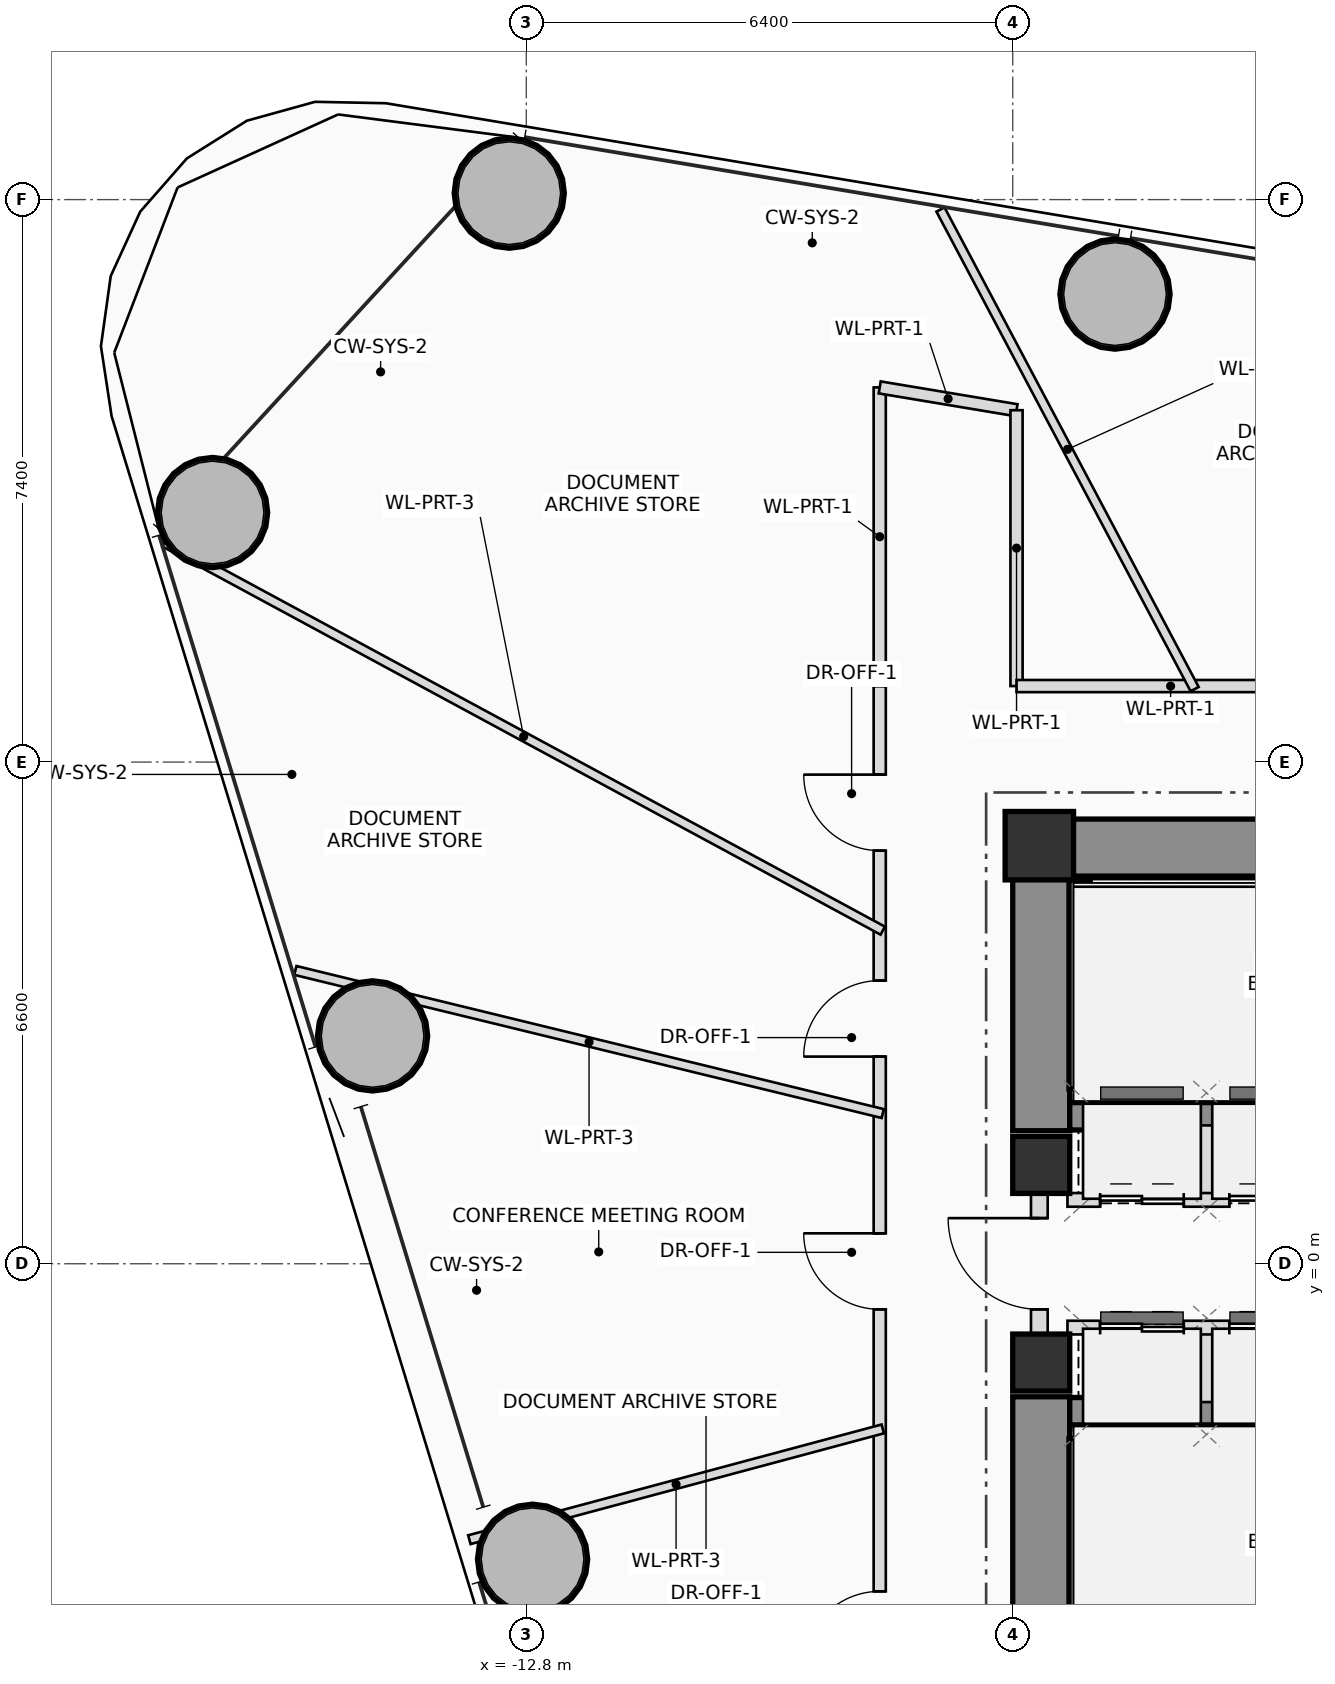
"""IFC4 building model, lengths in metres.
Left out: names, types, materials, properties, quantities, classifications, styles, units other than length and angle.
Written with IfcOpenShell. Run it as: python <this file> out.ifc"""

import sys

from ifc_helpers import new_model, si_unit, direction, frame, frame_2d, origin, origin_2d, place, context, subcontext, project, spatial, rectangle, hollow_circle, extrude, source, transform, mapped, element, fill, save


model = new_model("IFC4")
c1 = context("Model", 3, precision=1e-05, world=origin(), true_north=direction((0.0, 1.0)))
c2 = subcontext(c1, "Body", "Model", "MODEL_VIEW")
j1 = project(units=[si_unit("LENGTHUNIT", "METRE"), si_unit("PLANEANGLEUNIT", "RADIAN")], contexts=[c1])
p1 = place(None, origin())
s1 = spatial("IfcSite", under=j1, at=p1, CompositionType="ELEMENT")
p2 = place(p1, origin())
s2 = spatial("IfcBuilding", under=s1, at=p2, CompositionType="ELEMENT")
p3 = place(p2, frame((0.0, 0.0, 112.4)))
s3 = spatial("IfcBuildingStorey", under=s2, at=p3, CompositionType="ELEMENT", Elevation=112.4)
m1 = source(origin(), c2, "Body", "SweptSolid", [
    extrude(rectangle(XDim=0.9, YDim=0.9, at=origin_2d()), origin(), (0.0, 0.0, 1.0), 3.75),
])
p4 = place(p3, frame((-6.05, 5.5, 0.0), z_axis=(0.0, 0.0, 1.0), x_axis=(1.0, 0.0, 0.0)))
e1 = element("IfcColumn", 1, at=p4, inside=s3, PredefinedType="COLUMN", context=c2, shape_type="MappedRepresentation", body=[
    mapped(m1, transform((0.0, 0.0, 0.0), scale=1.0)),
])
p5 = place(p3, frame((-6.4, 5.475, 0.0), z_axis=(0.0, 0.0, 1.0), x_axis=(1.0, 0.0, 0.0)))
e2 = element("IfcWall", 2, at=p5, inside=s3, PredefinedType="SHEAR", context=c2, shape_type="SweptSolid", body=[
    extrude(rectangle(XDim=12.8, YDim=0.75, at=frame_2d((6.4, 0.0))), origin(), (0.0, 0.0, 1.0), 3.75),
])
p6 = place(p5, frame((8.6, 0.0, 0.0)))
e3 = element("IfcOpeningElement", 3, at=p6, cuts=e2, PredefinedType="OPENING", context=c2, shape_type="SweptSolid", body=[
    extrude(rectangle(XDim=1.2, YDim=2.2, at=frame_2d((0.6, 1.1))), frame((0.0, 0.385, 0.0), z_axis=(0.0, -1.0, 0.0), x_axis=(1.0, 0.0, 0.0)), (0.0, 0.0, 1.0), 0.77),
])
for number, where, z_axis, x_axis in (
    (4, (-6.025, -5.1, 0.0), (0.0, 0.0, 1.0), (0.0, 1.0, 0.0)),
    (5, (-6.025, 1.75, 0.0), (0.0, 0.0, 1.0), (0.0, 1.0, 0.0)),
):
    element("IfcWall", number, at=place(p3, frame(where, z_axis=z_axis, x_axis=x_axis)), inside=s3, PredefinedType="SHEAR", context=c2, shape_type="SweptSolid", body=[
        extrude(rectangle(XDim=3.35, YDim=0.75, at=frame_2d((1.675, 0.0))), origin(), (0.0, 0.0, 1.0), 3.75),
    ])
for number, where, z_axis, x_axis in (
    (6, (-5.65, 1.94, 0.0), (0.0, 0.0, 1.0), (1.0, 0.0, 0.0)),
    (7, (-5.65, -1.94, 0.0), (0.0, 0.0, 1.0), (1.0, 0.0, 0.0)),
):
    element("IfcWall", number, at=place(p3, frame(where, z_axis=z_axis, x_axis=x_axis)), inside=s3, PredefinedType="SHEAR", context=c2, shape_type="SweptSolid", body=[
        extrude(rectangle(XDim=11.3, YDim=0.36, at=frame_2d((5.65, 0.0))), origin(), (0.0, 0.0, 1.0), 3.75),
    ])
for number, where, z_axis, x_axis in (
    (8, (-5.52, 2.3, 0.0), (0.0, 0.0, 1.0), (0.0, 1.0, 0.0)),
    (9, (-5.52, -5.05, 0.0), (0.0, 0.0, 1.0), (0.0, 1.0, 0.0)),
):
    element("IfcWall", number, at=place(p3, frame(where, z_axis=z_axis, x_axis=x_axis)), inside=s3, PredefinedType="SHEAR", context=c2, shape_type="SweptSolid", body=[
        extrude(rectangle(XDim=2.75, YDim=0.28, at=frame_2d((1.375, 0.0))), origin(), (0.0, 0.0, 1.0), 3.75),
    ])
m2 = source(origin(), c2, "Body", "SweptSolid", [
    extrude(rectangle(XDim=0.75, YDim=0.75, at=origin_2d()), origin(), (0.0, 0.0, 1.0), 3.75),
])
for number, where, z_axis, x_axis in (
    (10, (-6.025, -1.3, 0.0), (0.0, 0.0, 1.0), (1.0, 0.0, 0.0)),
    (11, (-6.025, 1.3, 0.0), (0.0, 0.0, 1.0), (1.0, 0.0, 0.0)),
):
    element("IfcColumn", number, at=place(p3, frame(where, z_axis=z_axis, x_axis=x_axis)), inside=s3, PredefinedType="COLUMN", context=c2, shape_type="MappedRepresentation", body=[
        mapped(m2, transform((0.0, 0.0, 0.0), scale=1.0)),
    ])
m3 = source(origin(), c2, "Body", "SweptSolid", [
    extrude(hollow_circle(Radius=0.725, WallThickness=0.05, at=origin_2d()), origin(), (0.0, 0.0, 1.0), 3.75),
])
for number, where, z_axis, x_axis in (
    (12, (-5.054, 12.757, 0.0), (0.0, 0.0, 1.0), (1.0, 0.0, 0.0)),
    (13, (-13.024, 14.085, 0.0), (0.0, 0.0, 1.0), (1.0, 0.0, 0.0)),
    (14, (-16.927, 9.883, 0.0), (0.0, 0.0, 1.0), (1.0, 0.0, 0.0)),
    (15, (-14.823, 2.998, 0.0), (0.0, 0.0, 1.0), (1.0, 0.0, 0.0)),
    (16, (-12.717, -3.888, 0.0), (0.0, 0.0, 1.0), (1.0, 0.0, 0.0)),
):
    element("IfcColumn", number, at=place(p3, frame(where, z_axis=z_axis, x_axis=x_axis)), inside=s3, PredefinedType="COLUMN", context=c2, shape_type="MappedRepresentation", body=[
        mapped(m3, transform((0.0, 0.0, 0.0), scale=1.0)),
    ])
p7 = place(p3, frame((-6.05, -0.95, 0.0), z_axis=(0.0, 0.0, 1.0), x_axis=(0.0, 1.0, 0.0)))
e17 = element("IfcWall", 17, at=p7, inside=s3, PredefinedType="PLUMBINGWALL", context=c2, shape_type="SweptSolid", body=[
    extrude(rectangle(XDim=1.9, YDim=0.22, at=frame_2d((0.95, 0.0))), origin(), (0.0, 0.0, 1.0), 2.525),
])
p8 = place(p7, frame((0.35, 0.0, 0.0)))
e18 = element("IfcOpeningElement", 18, at=p8, cuts=e17, PredefinedType="OPENING", context=c2, shape_type="SweptSolid", body=[
    extrude(rectangle(XDim=1.2, YDim=2.2, at=frame_2d((0.6, 1.1))), frame((0.0, 0.12, 0.0), z_axis=(0.0, -1.0, 0.0), x_axis=(1.0, 0.0, 0.0)), (0.0, 0.0, 1.0), 0.24),
])
for number, where, z_axis, x_axis in (
    (19, (-3.85, 0.84, 0.0), (0.0, 0.0, 1.0), (0.0, 1.0, 0.0)),
    (20, (-3.85, -1.82, 0.0), (0.0, 0.0, 1.0), (0.0, 1.0, 0.0)),
):
    element("IfcWall", number, at=place(p3, frame(where, z_axis=z_axis, x_axis=x_axis)), inside=s3, PredefinedType="PLUMBINGWALL", context=c2, shape_type="SweptSolid", body=[
        extrude(rectangle(XDim=0.98, YDim=0.18, at=frame_2d((0.49, 0.0))), origin(), (0.0, 0.0, 1.0), 3.545),
    ])
p9 = place(p3, frame((-5.68, 0.84, 0.0), z_axis=(0.0, 0.0, 1.0), x_axis=(1.0, 0.0, 0.0)))
e21 = element("IfcWall", 21, at=p9, inside=s3, PredefinedType="PLUMBINGWALL", context=c2, shape_type="SweptSolid", body=[
    extrude(rectangle(XDim=11.33, YDim=0.18, at=frame_2d((5.665, 0.0))), origin(), (0.0, 0.0, 1.0), 3.545),
])
p10 = place(p9, frame((0.43, 0.0, 0.0)))
e22 = element("IfcOpeningElement", 22, at=p10, cuts=e21, PredefinedType="OPENING", context=c2, shape_type="SweptSolid", body=[
    extrude(rectangle(XDim=1.1, YDim=2.2, at=frame_2d((0.55, 1.1))), frame((0.0, 0.1, 0.0), z_axis=(0.0, -1.0, 0.0), x_axis=(1.0, 0.0, 0.0)), (0.0, 0.0, 1.0), 0.2),
])
p11 = place(p9, frame((2.13, 0.0, 0.0)))
e23 = element("IfcOpeningElement", 23, at=p11, cuts=e21, PredefinedType="OPENING", context=c2, shape_type="SweptSolid", body=[
    extrude(rectangle(XDim=1.1, YDim=2.2, at=frame_2d((0.55, 1.1))), frame((0.0, 0.1, 0.0), z_axis=(0.0, -1.0, 0.0), x_axis=(1.0, 0.0, 0.0)), (0.0, 0.0, 1.0), 0.2),
])
p12 = place(p3, frame((-5.68, -0.84, 0.0), z_axis=(0.0, 0.0, 1.0), x_axis=(1.0, 0.0, 0.0)))
e24 = element("IfcWall", 24, at=p12, inside=s3, PredefinedType="PLUMBINGWALL", context=c2, shape_type="SweptSolid", body=[
    extrude(rectangle(XDim=10.22, YDim=0.18, at=frame_2d((5.11, 0.0))), origin(), (0.0, 0.0, 1.0), 3.545),
])
p13 = place(p12, frame((0.43, 0.0, 0.0)))
e25 = element("IfcOpeningElement", 25, at=p13, cuts=e24, PredefinedType="OPENING", context=c2, shape_type="SweptSolid", body=[
    extrude(rectangle(XDim=1.1, YDim=2.2, at=frame_2d((0.55, 1.1))), frame((0.0, 0.1, 0.0), z_axis=(0.0, -1.0, 0.0), x_axis=(1.0, 0.0, 0.0)), (0.0, 0.0, 1.0), 0.2),
])
p14 = place(p12, frame((2.13, 0.0, 0.0)))
e26 = element("IfcOpeningElement", 26, at=p14, cuts=e24, PredefinedType="OPENING", context=c2, shape_type="SweptSolid", body=[
    extrude(rectangle(XDim=1.1, YDim=2.2, at=frame_2d((0.55, 1.1))), frame((0.0, 0.1, 0.0), z_axis=(0.0, -1.0, 0.0), x_axis=(1.0, 0.0, 0.0)), (0.0, 0.0, 1.0), 0.2),
])
p15 = place(p12, frame((9.02, 0.0, 0.0)))
e27 = element("IfcOpeningElement", 27, at=p15, cuts=e24, PredefinedType="OPENING", context=c2, shape_type="SweptSolid", body=[
    extrude(rectangle(XDim=0.9, YDim=2.05, at=frame_2d((0.45, 1.025))), frame((0.0, 0.1, 0.0), z_axis=(0.0, -1.0, 0.0), x_axis=(1.0, 0.0, 0.0)), (0.0, 0.0, 1.0), 0.2),
])
p16 = place(p3, frame((-8.15, -7.6, 0.0), z_axis=(0.0, 0.0, 1.0), x_axis=(0.0, 1.0, 0.0)))
e28 = element("IfcWall", 28, at=p16, inside=s3, PredefinedType="PARTITIONING", context=c2, shape_type="SweptSolid", body=[
    extrude(rectangle(XDim=15.2, YDim=0.16, at=frame_2d((7.6, 0.0))), origin(), (0.0, 0.0, 1.0), 2.85),
])
p17 = place(p16, frame((2.29, 0.0, 0.0)))
e29 = element("IfcOpeningElement", 29, at=p17, cuts=e28, PredefinedType="OPENING", context=c2, shape_type="SweptSolid", body=[
    extrude(rectangle(XDim=1.0, YDim=2.25, at=frame_2d((0.5, 1.125))), frame((0.0, 0.09, 0.0), z_axis=(0.0, -1.0, 0.0), x_axis=(1.0, 0.0, 0.0)), (0.0, 0.0, 1.0), 0.18),
])
p18 = place(p16, frame((7.0, 0.0, 0.0)))
e30 = element("IfcOpeningElement", 30, at=p18, cuts=e28, PredefinedType="OPENING", context=c2, shape_type="SweptSolid", body=[
    extrude(rectangle(XDim=1.0, YDim=2.25, at=frame_2d((0.5, 1.125))), frame((0.0, 0.09, 0.0), z_axis=(0.0, -1.0, 0.0), x_axis=(1.0, 0.0, 0.0)), (0.0, 0.0, 1.0), 0.18),
])
p19 = place(p16, frame((10.325, 0.0, 0.0)))
e31 = element("IfcOpeningElement", 31, at=p19, cuts=e28, PredefinedType="OPENING", context=c2, shape_type="SweptSolid", body=[
    extrude(rectangle(XDim=1.0, YDim=2.25, at=frame_2d((0.5, 1.125))), frame((0.0, 0.09, 0.0), z_axis=(0.0, -1.0, 0.0), x_axis=(1.0, 0.0, 0.0)), (0.0, 0.0, 1.0), 0.18),
])
p20 = place(p16, frame((13.035, 0.0, 0.0)))
e32 = element("IfcOpeningElement", 32, at=p20, cuts=e28, PredefinedType="OPENING", context=c2, shape_type="SweptSolid", body=[
    extrude(rectangle(XDim=1.0, YDim=2.25, at=frame_2d((0.5, 1.125))), frame((0.0, 0.09, 0.0), z_axis=(0.0, -1.0, 0.0), x_axis=(1.0, 0.0, 0.0)), (0.0, 0.0, 1.0), 0.18),
])
p21 = place(p3, frame((-8.15, 7.6, 0.0), z_axis=(0.0, 0.0, 1.0), x_axis=(0.0, 1.0, 0.0)))
e33 = element("IfcWall", 33, at=p21, inside=s3, PredefinedType="PARTITIONING", context=c2, shape_type="SweptSolid", body=[
    extrude(rectangle(XDim=3.929, YDim=0.16, at=frame_2d((1.964, 0.0))), origin(), (0.0, 0.0, 1.0), 2.85),
])
p22 = place(p3, frame((-8.15, 11.529, 0.0), z_axis=(0.0, 0.0, 1.0), x_axis=(0.986408385389, -0.164312194419, 0.0)))
e34 = element("IfcWall", 34, at=p22, inside=s3, PredefinedType="PARTITIONING", context=c2, shape_type="SweptSolid", body=[
    extrude(rectangle(XDim=1.825, YDim=0.16, at=frame_2d((0.912, 0.0))), origin(), (0.0, 0.0, 1.0), 3.545),
])
p23 = place(p3, frame((-6.35, 11.229, 0.0), z_axis=(0.0, 0.0, 1.0), x_axis=(0.0, -1.0, 0.0)))
e35 = element("IfcWall", 35, at=p23, inside=s3, PredefinedType="PARTITIONING", context=c2, shape_type="SweptSolid", body=[
    extrude(rectangle(XDim=3.629, YDim=0.16, at=frame_2d((1.814, 0.0))), origin(), (0.0, 0.0, 1.0), 3.05),
])
p24 = place(p3, frame((-6.35, 7.6, 0.0), z_axis=(0.0, 0.0, 1.0), x_axis=(1.0, 0.0, 0.0)))
e36 = element("IfcWall", 36, at=p24, inside=s3, PredefinedType="PARTITIONING", context=c2, shape_type="SweptSolid", body=[
    extrude(rectangle(XDim=12.7, YDim=0.16, at=frame_2d((6.35, 0.0))), origin(), (0.0, 0.0, 1.0), 2.85),
])
p25 = place(p24, frame((4.205, 0.0, 0.0)))
e37 = element("IfcOpeningElement", 37, at=p25, cuts=e36, PredefinedType="OPENING", context=c2, shape_type="SweptSolid", body=[
    extrude(rectangle(XDim=1.0, YDim=2.25, at=frame_2d((0.5, 1.125))), frame((0.0, 0.09, 0.0), z_axis=(0.0, -1.0, 0.0), x_axis=(1.0, 0.0, 0.0)), (0.0, 0.0, 1.0), 0.18),
])
p26 = place(p24, frame((7.823, 0.0, 0.0)))
e38 = element("IfcOpeningElement", 38, at=p26, cuts=e36, PredefinedType="OPENING", context=c2, shape_type="SweptSolid", body=[
    extrude(rectangle(XDim=1.0, YDim=2.25, at=frame_2d((0.5, 1.125))), frame((0.0, 0.09, 0.0), z_axis=(0.0, -1.0, 0.0), x_axis=(1.0, 0.0, 0.0)), (0.0, 0.0, 1.0), 0.18),
])
p27 = place(p24, frame((10.522, 0.0, 0.0)))
e39 = element("IfcOpeningElement", 39, at=p27, cuts=e36, PredefinedType="OPENING", context=c2, shape_type="SweptSolid", body=[
    extrude(rectangle(XDim=1.0, YDim=2.25, at=frame_2d((0.5, 1.125))), frame((0.0, 0.09, 0.0), z_axis=(0.0, -1.0, 0.0), x_axis=(1.0, 0.0, 0.0)), (0.0, 0.0, 1.0), 0.18),
])
p28 = place(p3, frame((-8.11, -2.173, 0.0), z_axis=(0.0, 0.0, 1.0), x_axis=(-0.965926955368, -0.258814831287, 0.0)))
e40 = element("IfcWall", 40, at=p28, inside=s3, PredefinedType="PARTITIONING", context=c2, shape_type="SweptSolid", body=[
    extrude(rectangle(XDim=5.631, YDim=0.12, at=frame_2d((2.815, 0.0))), origin(), (0.0, 0.0, 1.0), 3.05),
])
p29 = place(p3, frame((-4.007, 7.56, 0.0), z_axis=(0.0, 0.0, 1.0), x_axis=(-0.468285095747, 0.883577426772, 0.0)))
e41 = element("IfcWall", 41, at=p29, inside=s3, PredefinedType="PARTITIONING", context=c2, shape_type="SweptSolid", body=[
    extrude(rectangle(XDim=7.141, YDim=0.12, at=frame_2d((3.57, 0.0))), origin(), (0.0, 0.0, 1.0), 2.85),
])
p30 = place(p3, frame((-8.11, 4.382, 0.0), z_axis=(0.0, 0.0, 1.0), x_axis=(-0.879765097161, 0.47540863877, 0.0)))
e42 = element("IfcWall", 42, at=p30, inside=s3, PredefinedType="PARTITIONING", context=c2, shape_type="SweptSolid", body=[
    extrude(rectangle(XDim=10.741, YDim=0.12, at=frame_2d((5.371, 0.0))), origin(), (0.0, 0.0, 1.0), 2.85),
])
p31 = place(p3, frame((-8.11, 1.976, 0.0), z_axis=(0.0, 0.0, 1.0), x_axis=(-0.971576662732, 0.236725132665, 0.0)))
e43 = element("IfcWall", 43, at=p31, inside=s3, PredefinedType="PARTITIONING", context=c2, shape_type="SweptSolid", body=[
    extrude(rectangle(XDim=7.955, YDim=0.12, at=frame_2d((3.977, 0.0))), origin(), (0.0, 0.0, 1.0), 2.85),
])
p32 = place(p8, origin())
e44 = element("IfcDoor", 44, at=p32, inside=s3, OperationType="SINGLE_SWING_RIGHT", PredefinedType="DOOR", context=c2, shape_type="SweptSolid", body=[
    extrude(rectangle(XDim=1.2, YDim=2.2, at=frame_2d((0.6, 1.1))), frame((0.0, 0.025, 0.0), z_axis=(0.0, -1.0, 0.0), x_axis=(1.0, 0.0, 0.0)), (0.0, 0.0, 1.0), 0.05),
])
fill(e18, e44)
p33 = place(p10, origin())
e45 = element("IfcDoor", 45, at=p33, inside=s3, OperationType="DOUBLE_DOOR_SLIDING", PredefinedType="DOOR", context=c2, shape_type="SweptSolid", body=[
    extrude(rectangle(XDim=1.1, YDim=2.2, at=frame_2d((0.55, 1.1))), frame((0.0, 0.025, 0.0), z_axis=(0.0, -1.0, 0.0), x_axis=(1.0, 0.0, 0.0)), (0.0, 0.0, 1.0), 0.05),
])
fill(e22, e45)
p34 = place(p11, origin())
e46 = element("IfcDoor", 46, at=p34, inside=s3, OperationType="DOUBLE_DOOR_SLIDING", PredefinedType="DOOR", context=c2, shape_type="SweptSolid", body=[
    extrude(rectangle(XDim=1.1, YDim=2.2, at=frame_2d((0.55, 1.1))), frame((0.0, 0.025, 0.0), z_axis=(0.0, -1.0, 0.0), x_axis=(1.0, 0.0, 0.0)), (0.0, 0.0, 1.0), 0.05),
])
fill(e23, e46)
p35 = place(p13, origin())
e47 = element("IfcDoor", 47, at=p35, inside=s3, OperationType="DOUBLE_DOOR_SLIDING", PredefinedType="DOOR", context=c2, shape_type="SweptSolid", body=[
    extrude(rectangle(XDim=1.1, YDim=2.2, at=frame_2d((0.55, 1.1))), frame((0.0, 0.025, 0.0), z_axis=(0.0, -1.0, 0.0), x_axis=(1.0, 0.0, 0.0)), (0.0, 0.0, 1.0), 0.05),
])
fill(e25, e47)
p36 = place(p14, origin())
e48 = element("IfcDoor", 48, at=p36, inside=s3, OperationType="DOUBLE_DOOR_SLIDING", PredefinedType="DOOR", context=c2, shape_type="SweptSolid", body=[
    extrude(rectangle(XDim=1.1, YDim=2.2, at=frame_2d((0.55, 1.1))), frame((0.0, 0.025, 0.0), z_axis=(0.0, -1.0, 0.0), x_axis=(1.0, 0.0, 0.0)), (0.0, 0.0, 1.0), 0.05),
])
fill(e26, e48)
p37 = place(p17, origin())
e49 = element("IfcDoor", 49, at=p37, inside=s3, OperationType="SINGLE_SWING_LEFT", PredefinedType="DOOR", context=c2, shape_type="SweptSolid", body=[
    extrude(rectangle(XDim=1.0, YDim=2.25, at=frame_2d((0.5, 1.125))), frame((0.0, 0.025, 0.0), z_axis=(0.0, -1.0, 0.0), x_axis=(1.0, 0.0, 0.0)), (0.0, 0.0, 1.0), 0.05),
])
fill(e29, e49)
p38 = place(p18, origin())
e50 = element("IfcDoor", 50, at=p38, inside=s3, OperationType="SINGLE_SWING_RIGHT", PredefinedType="DOOR", context=c2, shape_type="SweptSolid", body=[
    extrude(rectangle(XDim=1.0, YDim=2.25, at=frame_2d((0.5, 1.125))), frame((0.0, 0.025, 0.0), z_axis=(0.0, -1.0, 0.0), x_axis=(1.0, 0.0, 0.0)), (0.0, 0.0, 1.0), 0.05),
])
fill(e30, e50)
p39 = place(p19, origin())
e51 = element("IfcDoor", 51, at=p39, inside=s3, OperationType="SINGLE_SWING_LEFT", PredefinedType="DOOR", context=c2, shape_type="SweptSolid", body=[
    extrude(rectangle(XDim=1.0, YDim=2.25, at=frame_2d((0.5, 1.125))), frame((0.0, 0.025, 0.0), z_axis=(0.0, -1.0, 0.0), x_axis=(1.0, 0.0, 0.0)), (0.0, 0.0, 1.0), 0.05),
])
fill(e31, e51)
p40 = place(p20, origin())
e52 = element("IfcDoor", 52, at=p40, inside=s3, OperationType="SINGLE_SWING_RIGHT", PredefinedType="DOOR", context=c2, shape_type="SweptSolid", body=[
    extrude(rectangle(XDim=1.0, YDim=2.25, at=frame_2d((0.5, 1.125))), frame((0.0, 0.025, 0.0), z_axis=(0.0, -1.0, 0.0), x_axis=(1.0, 0.0, 0.0)), (0.0, 0.0, 1.0), 0.05),
])
fill(e32, e52)
save(model, sys.argv[1])
